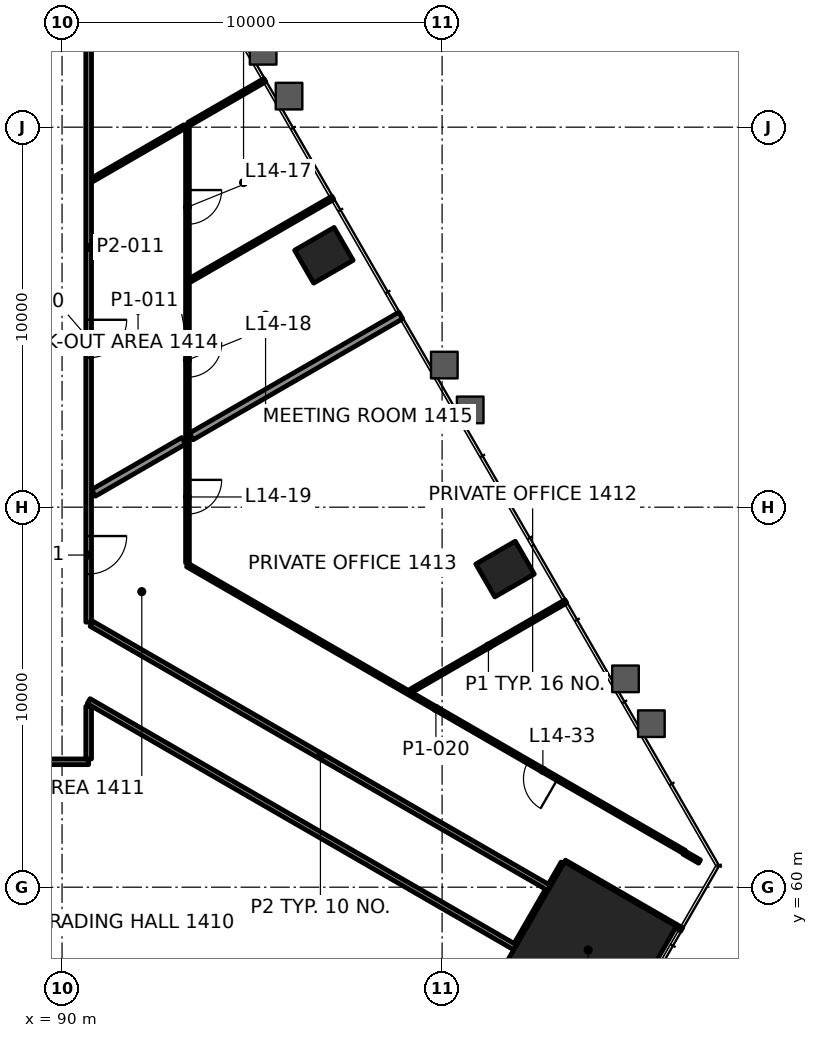
"""IFC4 building model, lengths in metres.
Left out: names, types, materials, properties, quantities, classifications, styles, units other than length and angle.
Written with IfcOpenShell. Run it as: python <this file> out.ifc"""

import sys

from ifc_helpers import new_model, si_unit, direction, frame, frame_2d, origin, origin_2d, place, context, subcontext, project, spatial, rectangle, extrude, element, fill, save


model = new_model("IFC4")
c1 = context("Model", 3, precision=1e-05, world=origin(), true_north=direction((0.0, 1.0)))
c2 = subcontext(c1, "Body", "Model", "MODEL_VIEW")
j1 = project(units=[si_unit("LENGTHUNIT", "METRE"), si_unit("PLANEANGLEUNIT", "RADIAN")], contexts=[c1])
p1 = place(None, origin())
s1 = spatial("IfcSite", under=j1, at=p1, CompositionType="ELEMENT")
p2 = place(p1, origin())
s2 = spatial("IfcBuilding", under=s1, at=p2, CompositionType="ELEMENT")
p3 = place(p2, frame((0.0, 0.0, 65.2)))
s3 = spatial("IfcBuildingStorey", under=s2, at=p3, CompositionType="ELEMENT", Elevation=65.2)
p4 = place(p3, frame((103.844, 58.347, 0.0), z_axis=(0.0, 0.0, 1.0), x_axis=(0.5, 0.866025403784, 0.0)))
e1 = element("IfcColumn", 1, at=p4, inside=s3, PredefinedType="COLUMN", context=c2, shape_type="SweptSolid", body=[
    extrude(rectangle(XDim=3.4, YDim=3.4, at=origin_2d()), origin(), (0.0, 0.0, 1.0), 4.2),
])
for number, where, z_axis, x_axis in (
    (2, (101.657, 68.371, -0.0), (0.0, 0.0, 1.0), (-0.5, 0.866, 0.0)),
    (3, (96.889, 76.628, -0.0), (0.0, 0.0, 1.0), (-0.5, 0.866, 0.0)),
):
    element("IfcColumn", number, at=place(p3, frame(where, z_axis=z_axis, x_axis=x_axis)), inside=s3, PredefinedType="COLUMN", context=c2, shape_type="SweptSolid", body=[
        extrude(rectangle(XDim=1.0, YDim=1.2, at=origin_2d()), origin(), (0.0, 0.0, 1.0), 4.2),
    ])
p5 = place(p3, frame((90.699, 63.3, 0.0), z_axis=(0.0, 0.0, 1.0), x_axis=(-1.0, 0.0, 0.0)))
e4 = element("IfcWall", 4, at=p5, inside=s3, PredefinedType="PARTITIONING", context=c2, shape_type="SweptSolid", body=[
    extrude(rectangle(XDim=31.399, YDim=0.15, at=frame_2d((15.7, 0.0))), origin(), (0.0, 0.0, 1.0), 3.4),
])
p6 = place(p5, frame((4.968, 0.0, 0.0)))
e5 = element("IfcOpeningElement", 5, at=p6, cuts=e4, PredefinedType="OPENING", context=c2, shape_type="SweptSolid", body=[
    extrude(rectangle(XDim=1.2, YDim=2.1, at=frame_2d((0.6, 1.05))), frame((0.0, 0.085, 0.0), z_axis=(0.0, -1.0, 0.0), x_axis=(1.0, 0.0, 0.0)), (0.0, 0.0, 1.0), 0.17),
])
p7 = place(p5, frame((13.908, 0.0, 0.0)))
e6 = element("IfcOpeningElement", 6, at=p7, cuts=e4, PredefinedType="OPENING", context=c2, shape_type="SweptSolid", body=[
    extrude(rectangle(XDim=1.2, YDim=2.1, at=frame_2d((0.6, 1.05))), frame((0.0, 0.085, 0.0), z_axis=(0.0, -1.0, 0.0), x_axis=(1.0, 0.0, 0.0)), (0.0, 0.0, 1.0), 0.17),
])
p8 = place(p5, frame((24.14, 0.0, 0.0)))
e7 = element("IfcOpeningElement", 7, at=p8, cuts=e4, PredefinedType="OPENING", context=c2, shape_type="SweptSolid", body=[
    extrude(rectangle(XDim=1.0, YDim=2.1, at=frame_2d((0.5, 1.05))), frame((0.0, 0.085, 0.0), z_axis=(0.0, -1.0, 0.0), x_axis=(1.0, 0.0, 0.0)), (0.0, 0.0, 1.0), 0.17),
])
p9 = place(p3, frame((99.182, 65.168, 0.0), z_axis=(0.0, 0.0, 1.0), x_axis=(0.866024864377, 0.50000093428, 0.0)))
e8 = element("IfcWall", 8, at=p9, inside=s3, PredefinedType="PARTITIONING", context=c2, shape_type="SweptSolid", body=[
    extrude(rectangle(XDim=4.705, YDim=0.1, at=frame_2d((2.353, 0.0))), origin(), (0.0, 0.0, 1.0), 3.4),
])
p10 = place(p3, frame((90.827, 70.376, 0.0), z_axis=(0.0, 0.0, 1.0), x_axis=(0.866019409031, 0.500010383074, 0.0)))
e9 = element("IfcWall", 9, at=p10, inside=s3, PredefinedType="PARTITIONING", context=c2, shape_type="SweptSolid", body=[
    extrude(rectangle(XDim=2.74, YDim=0.2, at=frame_2d((1.37, 0.0))), origin(), (0.0, 0.0, 1.0), 3.4),
])
p11 = place(p3, frame((93.376, 75.976, 0.0), z_axis=(0.0, 0.0, 1.0), x_axis=(0.866006192811, 0.500033272906, 0.0)))
e10 = element("IfcWall", 10, at=p11, inside=s3, PredefinedType="PARTITIONING", context=c2, shape_type="SweptSolid", body=[
    extrude(rectangle(XDim=4.329, YDim=0.1, at=frame_2d((2.165, 0.0))), origin(), (0.0, 0.0, 1.0), 3.165),
])
p12 = place(p3, frame((90.801, 78.618, 0.0), z_axis=(0.0, 0.0, 1.0), x_axis=(0.866028733576, 0.499994232587, 0.0)))
e11 = element("IfcWall", 11, at=p12, inside=s3, PredefinedType="PARTITIONING", context=c2, shape_type="SweptSolid", body=[
    extrude(rectangle(XDim=2.799, YDim=0.1, at=frame_2d((1.4, 0.0))), origin(), (0.0, 0.0, 1.0), 3.4),
])
p13 = place(p3, frame((101.96, 58.482, 0.0), z_axis=(0.0, 0.0, 1.0), x_axis=(0.500102515474, 0.865966208357, 0.0)))
e12 = element("IfcWall", 12, at=p13, inside=s3, PredefinedType="PARTITIONING", context=c2, shape_type="SweptSolid", body=[
    extrude(rectangle(XDim=1.65, YDim=0.15, at=frame_2d((0.825, 0.0))), origin(), (0.0, 0.0, 1.0), 3.247),
])
p14 = place(p3, frame((93.3, 80.061, 0.0), z_axis=(0.0, 0.0, 1.0), x_axis=(0.0, -1.0, 0.0)))
e13 = element("IfcWall", 13, at=p14, inside=s3, PredefinedType="PARTITIONING", context=c2, shape_type="SweptSolid", body=[
    extrude(rectangle(XDim=11.527, YDim=0.1, at=frame_2d((5.764, 0.0))), origin(), (0.0, 0.0, 1.0), 3.4),
])
p15 = place(p14, frame((1.716, 0.0, 0.0)))
e14 = element("IfcOpeningElement", 14, at=p15, cuts=e13, PredefinedType="OPENING", context=c2, shape_type="SweptSolid", body=[
    extrude(rectangle(XDim=0.9, YDim=2.1, at=frame_2d((0.45, 1.05))), frame((0.0, 0.06, 0.0), z_axis=(0.0, -1.0, 0.0), x_axis=(1.0, 0.0, 0.0)), (0.0, 0.0, 1.0), 0.12),
])
p16 = place(p14, frame((5.741, 0.0, 0.0)))
e15 = element("IfcOpeningElement", 15, at=p16, cuts=e13, PredefinedType="OPENING", context=c2, shape_type="SweptSolid", body=[
    extrude(rectangle(XDim=0.9, YDim=2.1, at=frame_2d((0.45, 1.05))), frame((0.0, 0.06, 0.0), z_axis=(0.0, -1.0, 0.0), x_axis=(1.0, 0.0, 0.0)), (0.0, 0.0, 1.0), 0.12),
])
p17 = place(p14, frame((9.342, 0.0, 0.0)))
e16 = element("IfcOpeningElement", 16, at=p17, cuts=e13, PredefinedType="OPENING", context=c2, shape_type="SweptSolid", body=[
    extrude(rectangle(XDim=0.9, YDim=2.1, at=frame_2d((0.45, 1.05))), frame((0.0, 0.06, 0.0), z_axis=(0.0, -1.0, 0.0), x_axis=(1.0, 0.0, 0.0)), (0.0, 0.0, 1.0), 0.12),
])
p18 = place(p3, frame((90.7, 63.375, 0.0), z_axis=(0.0, 0.0, 1.0), x_axis=(0.0, 1.0, 0.0)))
e17 = element("IfcWall", 17, at=p18, inside=s3, PredefinedType="PARTITIONING", context=c2, shape_type="SweptSolid", body=[
    extrude(rectangle(XDim=1.384, YDim=0.15, at=frame_2d((0.692, 0.0))), origin(), (0.0, 0.0, 1.0), 3.247),
])
p19 = place(p3, frame((90.7, 86.699, 0.0), z_axis=(0.0, 0.0, 1.0), x_axis=(0.0, -1.0, 0.0)))
e18 = element("IfcWall", 18, at=p19, inside=s3, PredefinedType="PARTITIONING", context=c2, shape_type="SweptSolid", body=[
    extrude(rectangle(XDim=19.725, YDim=0.15, at=frame_2d((9.862, 0.0))), origin(), (0.0, 0.0, 1.0), 3.4),
])
p20 = place(p19, frame((11.768, 0.0, 0.0)))
e19 = element("IfcOpeningElement", 19, at=p20, cuts=e18, PredefinedType="OPENING", context=c2, shape_type="SweptSolid", body=[
    extrude(rectangle(XDim=1.0, YDim=2.1, at=frame_2d((0.5, 1.05))), frame((0.0, 0.085, 0.0), z_axis=(0.0, -1.0, 0.0), x_axis=(1.0, 0.0, 0.0)), (0.0, 0.0, 1.0), 0.17),
])
p21 = place(p19, frame((17.459, 0.0, 0.0)))
e20 = element("IfcOpeningElement", 20, at=p21, cuts=e18, PredefinedType="OPENING", context=c2, shape_type="SweptSolid", body=[
    extrude(rectangle(XDim=1.0, YDim=2.1, at=frame_2d((0.5, 1.05))), frame((0.0, 0.085, 0.0), z_axis=(0.0, -1.0, 0.0), x_axis=(1.0, 0.0, 0.0)), (0.0, 0.0, 1.0), 0.17),
])
p22 = place(p3, frame((106.374, 60.928, 0.0), z_axis=(0.0, 0.0, 1.0), x_axis=(-0.866022109353, 0.50000570608, 0.0)))
e21 = element("IfcWall", 21, at=p22, inside=s3, PredefinedType="PARTITIONING", context=c2, shape_type="SweptSolid", body=[
    extrude(rectangle(XDim=15.096, YDim=0.1, at=frame_2d((7.548, 0.0))), origin(), (0.0, 0.0, 1.0), 3.4),
])
p23 = place(p22, frame((3.847, 0.0, 0.0)))
e22 = element("IfcOpeningElement", 22, at=p23, cuts=e21, PredefinedType="OPENING", context=c2, shape_type="SweptSolid", body=[
    extrude(rectangle(XDim=0.9, YDim=2.1, at=frame_2d((0.45, 1.05))), frame((0.0, 0.06, 0.0), z_axis=(0.0, -1.0, 0.0), x_axis=(1.0, 0.0, 0.0)), (0.0, 0.0, 1.0), 0.12),
])
p24 = place(p3, frame((106.774, 60.675, 0.0), z_axis=(0.0, 0.0, 1.0), x_axis=(-0.865979310119, 0.500079828073, 0.0)))
e23 = element("IfcWall", 23, at=p24, inside=s3, PredefinedType="PARTITIONING", context=c2, shape_type="SweptSolid", body=[
    extrude(rectangle(XDim=0.473, YDim=0.1, at=frame_2d((0.237, 0.0))), origin(), (0.0, 0.0, 1.0), 3.4),
])
p25 = place(p3, frame((106.305, 58.888, 0.0), z_axis=(0.0, 0.0, 1.0), x_axis=(-0.866061095881, 0.499938174379, 0.0)))
e24 = element("IfcWall", 24, at=p25, inside=s3, PredefinedType="PARTITIONING", context=c2, shape_type="SweptSolid", body=[
    extrude(rectangle(XDim=3.56, YDim=0.1, at=frame_2d((1.78, 0.0))), origin(), (0.0, 0.0, 1.0), 3.4),
])
p26 = place(p3, frame((102.822, 59.976, 0.0), z_axis=(0.0, 0.0, 1.0), x_axis=(-0.866019280802, 0.500010605167, 0.0)))
e25 = element("IfcWall", 25, at=p26, inside=s3, PredefinedType="PARTITIONING", context=c2, shape_type="SweptSolid", body=[
    extrude(rectangle(XDim=13.91, YDim=0.15, at=frame_2d((6.955, 0.0))), origin(), (0.0, 0.0, 1.0), 3.4),
])
p27 = place(p3, frame((101.922, 58.417, 0.0), z_axis=(0.0, 0.0, 1.0), x_axis=(-0.866024629744, 0.500001340675, 0.0)))
e26 = element("IfcWall", 26, at=p27, inside=s3, PredefinedType="PARTITIONING", context=c2, shape_type="SweptSolid", body=[
    extrude(rectangle(XDim=12.958, YDim=0.15, at=frame_2d((6.479, 0.0))), origin(), (0.0, 0.0, 1.0), 3.247),
])
p28 = place(p3, frame((93.4, 71.862, 0.0), z_axis=(0.0, 0.0, 1.0), x_axis=(0.866018247172, 0.500012395411, 0.0)))
e27 = element("IfcWall", 27, at=p28, inside=s3, PredefinedType="PARTITIONING", context=c2, shape_type="SweptSolid", body=[
    extrude(rectangle(XDim=6.365, YDim=0.2, at=frame_2d((3.183, 0.0))), origin(), (0.0, 0.0, 1.0), 3.165),
])
p29 = place(p3, frame((93.337, 80.083, 0.0), z_axis=(0.0, 0.0, 1.0), x_axis=(0.866028885721, 0.49999396906, 0.0)))
e28 = element("IfcWall", 28, at=p29, inside=s3, PredefinedType="PARTITIONING", context=c2, shape_type="SweptSolid", body=[
    extrude(rectangle(XDim=2.309, YDim=0.1, at=frame_2d((1.155, 0.0))), origin(), (0.0, 0.0, 1.0), 3.165),
])
p30 = place(p3, frame((102.86, 60.041, 0.0), z_axis=(0.0, 0.0, 1.0), x_axis=(0.500036104519, 0.866004557827, 0.0)))
e29 = element("IfcWall", 29, at=p30, inside=s3, PredefinedType="PARTITIONING", context=c2, shape_type="SweptSolid", body=[
    extrude(rectangle(XDim=0.674, YDim=0.15, at=frame_2d((0.337, 0.0))), origin(), (0.0, 0.0, 1.0), 3.4),
])
p31 = place(p15, origin())
e30 = element("IfcDoor", 30, at=p31, inside=s3, OperationType="SINGLE_SWING_RIGHT", PredefinedType="DOOR", context=c2, shape_type="SweptSolid", body=[
    extrude(rectangle(XDim=0.9, YDim=2.1, at=frame_2d((0.45, 1.05))), frame((0.0, 0.025, 0.0), z_axis=(0.0, -1.0, 0.0), x_axis=(1.0, 0.0, 0.0)), (0.0, 0.0, 1.0), 0.05),
])
fill(e14, e30)
p32 = place(p16, origin())
e31 = element("IfcDoor", 31, at=p32, inside=s3, OperationType="SINGLE_SWING_LEFT", PredefinedType="DOOR", context=c2, shape_type="SweptSolid", body=[
    extrude(rectangle(XDim=0.9, YDim=2.1, at=frame_2d((0.45, 1.05))), frame((0.0, 0.025, 0.0), z_axis=(0.0, -1.0, 0.0), x_axis=(1.0, 0.0, 0.0)), (0.0, 0.0, 1.0), 0.05),
])
fill(e15, e31)
p33 = place(p17, origin())
e32 = element("IfcDoor", 32, at=p33, inside=s3, OperationType="SINGLE_SWING_LEFT", PredefinedType="DOOR", context=c2, shape_type="SweptSolid", body=[
    extrude(rectangle(XDim=0.9, YDim=2.1, at=frame_2d((0.45, 1.05))), frame((0.0, 0.025, 0.0), z_axis=(0.0, -1.0, 0.0), x_axis=(1.0, 0.0, 0.0)), (0.0, 0.0, 1.0), 0.05),
])
fill(e16, e32)
p34 = place(p20, origin())
e33 = element("IfcDoor", 33, at=p34, inside=s3, OperationType="SINGLE_SWING_RIGHT", PredefinedType="DOOR", context=c2, shape_type="SweptSolid", body=[
    extrude(rectangle(XDim=1.0, YDim=2.1, at=frame_2d((0.5, 1.05))), frame((0.0, 0.025, 0.0), z_axis=(0.0, -1.0, 0.0), x_axis=(1.0, 0.0, 0.0)), (0.0, 0.0, 1.0), 0.05),
])
fill(e19, e33)
p35 = place(p21, origin())
e34 = element("IfcDoor", 34, at=p35, inside=s3, OperationType="SINGLE_SWING_LEFT", PredefinedType="DOOR", context=c2, shape_type="SweptSolid", body=[
    extrude(rectangle(XDim=1.0, YDim=2.1, at=frame_2d((0.5, 1.05))), frame((0.0, 0.025, 0.0), z_axis=(0.0, -1.0, 0.0), x_axis=(1.0, 0.0, 0.0)), (0.0, 0.0, 1.0), 0.05),
])
fill(e20, e34)
p36 = place(p23, origin())
e35 = element("IfcDoor", 35, at=p36, inside=s3, OperationType="SINGLE_SWING_LEFT", PredefinedType="DOOR", context=c2, shape_type="SweptSolid", body=[
    extrude(rectangle(XDim=0.9, YDim=2.1, at=frame_2d((0.45, 1.05))), frame((0.0, 0.025, 0.0), z_axis=(0.0, -1.0, 0.0), x_axis=(1.0, 0.0, 0.0)), (0.0, 0.0, 1.0), 0.05),
])
fill(e22, e35)
save(model, sys.argv[1])
